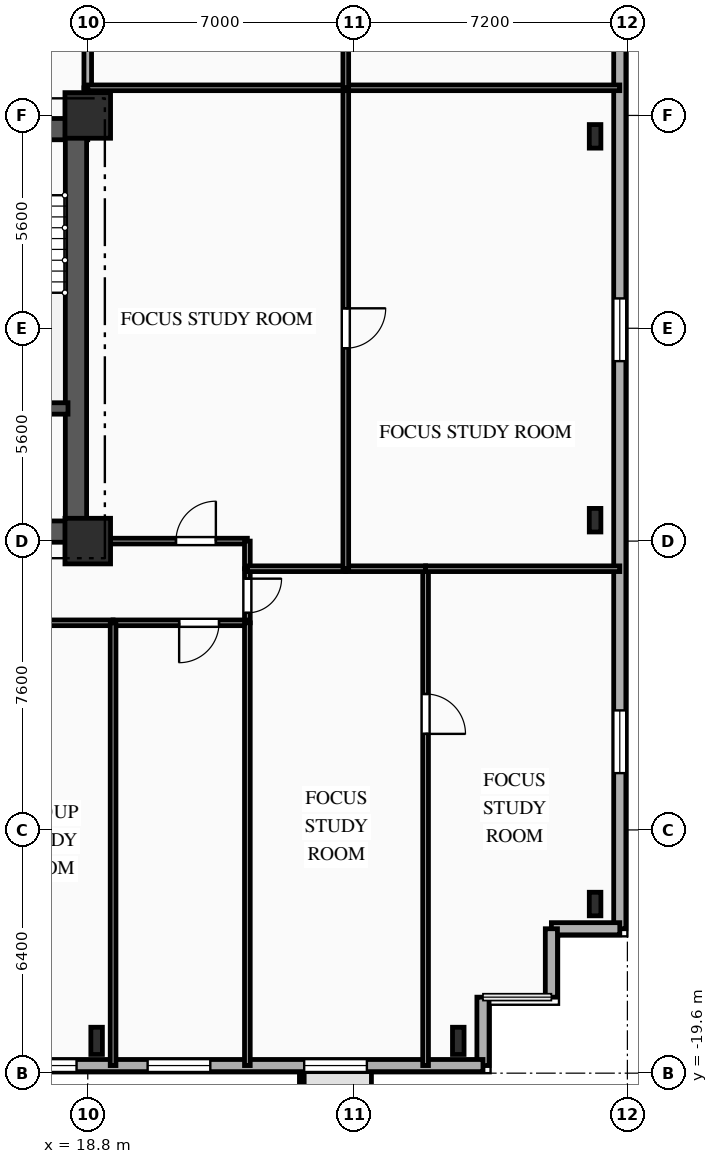
"""IFC4 building model, lengths in metres.
Left out: names, types, materials, properties, quantities, classifications, styles, units other than length and angle.
Written with IfcOpenShell. Run it as: python <this file> out.ifc"""

import sys

from ifc_helpers import new_model, si_unit, direction, frame, frame_2d, origin, origin_2d, place, context, subcontext, project, spatial, rectangle, i_section, extrude, element, fill, save


model = new_model("IFC4")
c1 = context("Model", 3, precision=1e-05, world=origin(), true_north=direction((0.0, 1.0)))
c2 = subcontext(c1, "Body", "Model", "MODEL_VIEW")
j1 = project(units=[si_unit("LENGTHUNIT", "METRE"), si_unit("PLANEANGLEUNIT", "RADIAN")], contexts=[c1])
p1 = place(None, origin())
s1 = spatial("IfcSite", under=j1, at=p1, CompositionType="ELEMENT")
p2 = place(p1, origin())
s2 = spatial("IfcBuilding", under=s1, at=p2, CompositionType="ELEMENT")
p3 = place(p2, frame((0.0, 0.0, 40.4)))
s3 = spatial("IfcBuildingStorey", under=s2, at=p3, CompositionType="ELEMENT", Elevation=40.4)
for number, where, z_axis, x_axis in (
    (1, (18.8, -5.6, 0.0), (0.0, 0.0, 1.0), (1.0, 0.0, 0.0)),
    (2, (18.8, 5.6, 0.0), (0.0, 0.0, 1.0), (1.0, 0.0, 0.0)),
):
    element("IfcColumn", number, at=place(p3, frame(where, z_axis=z_axis, x_axis=x_axis)), inside=s3, PredefinedType="COLUMN", context=c2, shape_type="SweptSolid", body=[
        extrude(rectangle(XDim=1.2, YDim=1.2, at=origin_2d()), origin(), (0.0, 0.0, 1.0), 3.35),
    ])
for number, where, z_axis, x_axis in (
    (3, (19.033, -18.75, 0.0), (0.0, 0.0, 1.0), (1.0, 0.0, 0.0)),
    (4, (28.55, -18.75, 0.0), (0.0, 0.0, 1.0), (1.0, 0.0, 0.0)),
):
    element("IfcColumn", number, at=place(p3, frame(where, z_axis=z_axis, x_axis=x_axis)), inside=s3, PredefinedType="COLUMN", context=c2, shape_type="SweptSolid", body=[
        extrude(i_section(OverallWidth=0.304, OverallDepth=0.716, WebThickness=0.021, FlangeThickness=0.04, FilletRadius=0.027, at=origin_2d()), origin(), (0.0, 0.0, 1.0), 3.35),
    ])
for number, where, z_axis, x_axis in (
    (5, (32.15, -15.15, 0.0), (0.0, 0.0, 1.0), (1.0, 0.0, 0.0)),
    (6, (32.15, -5.05, 0.0), (0.0, 0.0, 1.0), (1.0, 0.0, 0.0)),
    (7, (32.15, 5.05, 0.0), (0.0, 0.0, 1.0), (1.0, 0.0, 0.0)),
):
    element("IfcColumn", number, at=place(p3, frame(where, z_axis=z_axis, x_axis=x_axis)), inside=s3, PredefinedType="COLUMN", context=c2, shape_type="SweptSolid", body=[
        extrude(i_section(OverallWidth=0.305, OverallDepth=0.62, WebThickness=0.021, FlangeThickness=0.04, FilletRadius=0.027, at=origin_2d()), origin(), (0.0, 0.0, 1.0), 3.35),
    ])
p4 = place(p3, frame((32.8, 15.8, 0.0), z_axis=(0.0, 0.0, 1.0), x_axis=(0.0, -1.0, 0.0)))
e8 = element("IfcWall", 8, at=p4, inside=s3, PredefinedType="SOLIDWALL", context=c2, shape_type="SweptSolid", body=[
    extrude(rectangle(XDim=31.6, YDim=0.32, at=frame_2d((15.8, 0.0))), origin(), (0.0, 0.0, 1.0), 3.035),
])
p5 = place(p4, frame((4.175, 0.0, 0.85)))
e9 = element("IfcOpeningElement", 9, at=p5, cuts=e8, PredefinedType="OPENING", context=c2, shape_type="SweptSolid", body=[
    extrude(rectangle(XDim=1.65, YDim=1.85, at=frame_2d((0.825, 0.925))), frame((0.0, 0.17, 0.0), z_axis=(0.0, -1.0, 0.0), x_axis=(1.0, 0.0, 0.0)), (0.0, 0.0, 1.0), 0.34),
])
p6 = place(p4, frame((15.015, 0.0, 0.85)))
e10 = element("IfcOpeningElement", 10, at=p6, cuts=e8, PredefinedType="OPENING", context=c2, shape_type="SweptSolid", body=[
    extrude(rectangle(XDim=1.65, YDim=1.85, at=frame_2d((0.825, 0.925))), frame((0.0, 0.17, 0.0), z_axis=(0.0, -1.0, 0.0), x_axis=(1.0, 0.0, 0.0)), (0.0, 0.0, 1.0), 0.34),
])
p7 = place(p4, frame((25.855, 0.0, 0.85)))
e11 = element("IfcOpeningElement", 11, at=p7, cuts=e8, PredefinedType="OPENING", context=c2, shape_type="SweptSolid", body=[
    extrude(rectangle(XDim=1.65, YDim=1.85, at=frame_2d((0.825, 0.925))), frame((0.0, 0.17, 0.0), z_axis=(0.0, -1.0, 0.0), x_axis=(1.0, 0.0, 0.0)), (0.0, 0.0, 1.0), 0.34),
])
for number, where, z_axis, x_axis in (
    (12, (32.8, -15.8, 0.0), (0.0, 0.0, 1.0), (-1.0, 0.0, 0.0)),
    (13, (31.0, -15.8, 0.0), (0.0, 0.0, 1.0), (0.0, -1.0, 0.0)),
):
    element("IfcWall", number, at=place(p3, frame(where, z_axis=z_axis, x_axis=x_axis)), inside=s3, PredefinedType="SOLIDWALL", context=c2, shape_type="SweptSolid", body=[
        extrude(rectangle(XDim=1.8, YDim=0.32, at=frame_2d((0.9, 0.0))), origin(), (0.0, 0.0, 1.0), 3.035),
    ])
p8 = place(p3, frame((29.2, -17.6, 0.0), z_axis=(0.0, 0.0, 1.0), x_axis=(0.0, -1.0, 0.0)))
e14 = element("IfcWall", 14, at=p8, inside=s3, PredefinedType="SOLIDWALL", context=c2, shape_type="SweptSolid", body=[
    extrude(rectangle(XDim=1.8, YDim=0.32, at=frame_2d((0.9, 0.0))), origin(), (0.0, 0.0, 1.0), 3.035),
])
p9 = place(p3, frame((29.2, -19.4, 0.0), z_axis=(0.0, 0.0, 1.0), x_axis=(-1.0, 0.0, 0.0)))
e15 = element("IfcWall", 15, at=p9, inside=s3, PredefinedType="SOLIDWALL", context=c2, shape_type="SweptSolid", body=[
    extrude(rectangle(XDim=58.4, YDim=0.32, at=frame_2d((29.2, 0.0))), origin(), (0.0, 0.0, 1.0), 3.035),
])
p10 = place(p9, frame((3.055, 0.0, 0.85)))
e16 = element("IfcOpeningElement", 16, at=p10, cuts=e15, PredefinedType="OPENING", context=c2, shape_type="SweptSolid", body=[
    extrude(rectangle(XDim=1.65, YDim=1.85, at=frame_2d((0.825, 0.925))), frame((0.0, 0.17, 0.0), z_axis=(0.0, -1.0, 0.0), x_axis=(1.0, 0.0, 0.0)), (0.0, 0.0, 1.0), 0.34),
])
p11 = place(p9, frame((7.175, 0.0, 0.85)))
e17 = element("IfcOpeningElement", 17, at=p11, cuts=e15, PredefinedType="OPENING", context=c2, shape_type="SweptSolid", body=[
    extrude(rectangle(XDim=1.65, YDim=1.85, at=frame_2d((0.825, 0.925))), frame((0.0, 0.17, 0.0), z_axis=(0.0, -1.0, 0.0), x_axis=(1.0, 0.0, 0.0)), (0.0, 0.0, 1.0), 0.34),
])
p12 = place(p9, frame((10.695, 0.0, 0.85)))
e18 = element("IfcOpeningElement", 18, at=p12, cuts=e15, PredefinedType="OPENING", context=c2, shape_type="SweptSolid", body=[
    extrude(rectangle(XDim=1.65, YDim=1.85, at=frame_2d((0.825, 0.925))), frame((0.0, 0.17, 0.0), z_axis=(0.0, -1.0, 0.0), x_axis=(1.0, 0.0, 0.0)), (0.0, 0.0, 1.0), 0.34),
])
p13 = place(p9, frame((16.02, 0.0, 0.85)))
e19 = element("IfcOpeningElement", 19, at=p13, cuts=e15, PredefinedType="OPENING", context=c2, shape_type="SweptSolid", body=[
    extrude(rectangle(XDim=2.2, YDim=1.85, at=frame_2d((1.1, 0.925))), frame((0.0, 0.17, 0.0), z_axis=(0.0, -1.0, 0.0), x_axis=(1.0, 0.0, 0.0)), (0.0, 0.0, 1.0), 0.34),
])
p14 = place(p9, frame((23.7, 0.0, 0.85)))
e20 = element("IfcOpeningElement", 20, at=p14, cuts=e15, PredefinedType="OPENING", context=c2, shape_type="SweptSolid", body=[
    extrude(rectangle(XDim=2.2, YDim=1.85, at=frame_2d((1.1, 0.925))), frame((0.0, 0.17, 0.0), z_axis=(0.0, -1.0, 0.0), x_axis=(1.0, 0.0, 0.0)), (0.0, 0.0, 1.0), 0.34),
])
p15 = place(p9, frame((31.38, 0.0, 0.85)))
e21 = element("IfcOpeningElement", 21, at=p15, cuts=e15, PredefinedType="OPENING", context=c2, shape_type="SweptSolid", body=[
    extrude(rectangle(XDim=2.2, YDim=1.85, at=frame_2d((1.1, 0.925))), frame((0.0, 0.17, 0.0), z_axis=(0.0, -1.0, 0.0), x_axis=(1.0, 0.0, 0.0)), (0.0, 0.0, 1.0), 0.34),
])
p16 = place(p9, frame((39.06, 0.0, 0.85)))
e22 = element("IfcOpeningElement", 22, at=p16, cuts=e15, PredefinedType="OPENING", context=c2, shape_type="SweptSolid", body=[
    extrude(rectangle(XDim=2.2, YDim=1.85, at=frame_2d((1.1, 0.925))), frame((0.0, 0.17, 0.0), z_axis=(0.0, -1.0, 0.0), x_axis=(1.0, 0.0, 0.0)), (0.0, 0.0, 1.0), 0.34),
])
p17 = place(p9, frame((45.215, 0.0, 0.85)))
e23 = element("IfcOpeningElement", 23, at=p17, cuts=e15, PredefinedType="OPENING", context=c2, shape_type="SweptSolid", body=[
    extrude(rectangle(XDim=1.65, YDim=1.85, at=frame_2d((0.825, 0.925))), frame((0.0, 0.17, 0.0), z_axis=(0.0, -1.0, 0.0), x_axis=(1.0, 0.0, 0.0)), (0.0, 0.0, 1.0), 0.34),
])
p18 = place(p9, frame((49.335, 0.0, 0.85)))
e24 = element("IfcOpeningElement", 24, at=p18, cuts=e15, PredefinedType="OPENING", context=c2, shape_type="SweptSolid", body=[
    extrude(rectangle(XDim=1.65, YDim=1.85, at=frame_2d((0.825, 0.925))), frame((0.0, 0.17, 0.0), z_axis=(0.0, -1.0, 0.0), x_axis=(1.0, 0.0, 0.0)), (0.0, 0.0, 1.0), 0.34),
])
p19 = place(p3, frame((9.2, 5.24, 0.0), z_axis=(0.0, 0.0, 1.0), x_axis=(1.0, 0.0, 0.0)))
e25 = element("IfcWall", 25, at=p19, inside=s3, PredefinedType="SHEAR", context=c2, shape_type="SweptSolid", body=[
    extrude(rectangle(XDim=9.6, YDim=0.56, at=frame_2d((4.8, 0.0))), origin(), (0.0, 0.0, 1.0), 3.035),
])
p20 = place(p19, frame((6.95, 0.0, 0.0)))
e26 = element("IfcOpeningElement", 26, at=p20, cuts=e25, PredefinedType="OPENING", context=c2, shape_type="SweptSolid", body=[
    extrude(rectangle(XDim=1.1, YDim=2.15, at=frame_2d((0.55, 1.075))), frame((0.0, 0.29, 0.0), z_axis=(0.0, -1.0, 0.0), x_axis=(1.0, 0.0, 0.0)), (0.0, 0.0, 1.0), 0.58),
])
p21 = place(p19, frame((3.775, 0.0, 0.0)))
e27 = element("IfcOpeningElement", 27, at=p21, cuts=e25, PredefinedType="OPENING", context=c2, shape_type="SweptSolid", body=[
    extrude(rectangle(XDim=1.05, YDim=2.1, at=frame_2d((0.525, 1.05))), frame((0.0, 0.29, 0.0), z_axis=(0.0, -1.0, 0.0), x_axis=(1.0, 0.0, 0.0)), (0.0, 0.0, 1.0), 0.58),
])
p22 = place(p3, frame((9.2, -5.35, 0.0), z_axis=(0.0, 0.0, 1.0), x_axis=(1.0, 0.0, 0.0)))
e28 = element("IfcWall", 28, at=p22, inside=s3, PredefinedType="SHEAR", context=c2, shape_type="SweptSolid", body=[
    extrude(rectangle(XDim=9.6, YDim=0.56, at=frame_2d((4.8, 0.0))), origin(), (0.0, 0.0, 1.0), 3.035),
])
p23 = place(p22, frame((7.65, 0.0, 0.0)))
e29 = element("IfcOpeningElement", 29, at=p23, cuts=e28, PredefinedType="OPENING", context=c2, shape_type="SweptSolid", body=[
    extrude(rectangle(XDim=0.9, YDim=2.1, at=frame_2d((0.45, 1.05))), frame((0.0, 0.29, 0.0), z_axis=(0.0, -1.0, 0.0), x_axis=(1.0, 0.0, 0.0)), (0.0, 0.0, 1.0), 0.58),
])
p24 = place(p3, frame((18.49, -5.05, 0.0), z_axis=(0.0, 0.0, 1.0), x_axis=(0.0, 1.0, 0.0)))
e30 = element("IfcWall", 30, at=p24, inside=s3, PredefinedType="SHEAR", context=c2, shape_type="SweptSolid", body=[
    extrude(rectangle(XDim=10.1, YDim=0.56, at=frame_2d((5.05, 0.0))), origin(), (0.0, 0.0, 1.0), 3.035),
])
p25 = place(p3, frame((15.1, -2.11, 0.0), z_axis=(0.0, 0.0, 1.0), x_axis=(1.0, 0.0, 0.0)))
e31 = element("IfcWall", 31, at=p25, inside=s3, PredefinedType="SHEAR", context=c2, shape_type="SweptSolid", body=[
    extrude(rectangle(XDim=3.18, YDim=0.3, at=frame_2d((1.59, 0.0))), origin(), (0.0, 0.0, 1.0), 3.035),
])
p26 = place(p3, frame((18.8, 5.6, 0.0), z_axis=(0.0, 0.0, 1.0), x_axis=(0.0, 1.0, 0.0)))
e32 = element("IfcWall", 32, at=p26, inside=s3, PredefinedType="PARTITIONING", context=c2, shape_type="SweptSolid", body=[
    extrude(rectangle(XDim=0.727, YDim=0.2, at=frame_2d((0.363, 0.0))), origin(), (0.0, 0.0, 1.0), 2.52),
])
p27 = place(p3, frame((18.8, 6.327, 0.0), z_axis=(0.0, 0.0, 1.0), x_axis=(0.0, 1.0, 0.0)))
e33 = element("IfcWall", 33, at=p27, inside=s3, PredefinedType="PARTITIONING", context=c2, shape_type="SweptSolid", body=[
    extrude(rectangle(XDim=2.173, YDim=0.2, at=frame_2d((1.086, 0.0))), origin(), (0.0, 0.0, 1.0), 2.52),
])
p28 = place(p3, frame((23.0, -6.327, 0.0), z_axis=(0.0, 0.0, 1.0), x_axis=(0.0, -1.0, 0.0)))
e34 = element("IfcWall", 34, at=p28, inside=s3, PredefinedType="PARTITIONING", context=c2, shape_type="SweptSolid", body=[
    extrude(rectangle(XDim=1.423, YDim=0.15, at=frame_2d((0.711, 0.0))), origin(), (0.0, 0.0, 1.0), 3.035),
])
p29 = place(p28, frame((0.261, 0.0, 0.0)))
e35 = element("IfcOpeningElement", 35, at=p29, cuts=e34, PredefinedType="OPENING", context=c2, shape_type="SweptSolid", body=[
    extrude(rectangle(XDim=0.9, YDim=2.1, at=frame_2d((0.45, 1.05))), frame((0.0, 0.085, 0.0), z_axis=(0.0, -1.0, 0.0), x_axis=(1.0, 0.0, 0.0)), (0.0, 0.0, 1.0), 0.17),
])
p30 = place(p3, frame((18.8, -5.6, 0.0), z_axis=(0.0, 0.0, 1.0), x_axis=(1.0, 0.0, 0.0)))
e36 = element("IfcWall", 36, at=p30, inside=s3, PredefinedType="PARTITIONING", context=c2, shape_type="SweptSolid", body=[
    extrude(rectangle(XDim=4.2, YDim=0.15, at=frame_2d((2.1, 0.0))), origin(), (0.0, 0.0, 1.0), 3.035),
])
p31 = place(p30, frame((2.321, 0.0, 0.0)))
e37 = element("IfcOpeningElement", 37, at=p31, cuts=e36, PredefinedType="OPENING", context=c2, shape_type="SweptSolid", body=[
    extrude(rectangle(XDim=1.05, YDim=2.15, at=frame_2d((0.525, 1.075))), frame((0.0, 0.085, 0.0), z_axis=(0.0, -1.0, 0.0), x_axis=(1.0, 0.0, 0.0)), (0.0, 0.0, 1.0), 0.17),
])
p32 = place(p3, frame((23.0, -5.6, 0.0), z_axis=(0.0, 0.0, 1.0), x_axis=(0.0, -1.0, 0.0)))
e38 = element("IfcWall", 38, at=p32, inside=s3, PredefinedType="PARTITIONING", context=c2, shape_type="SweptSolid", body=[
    extrude(rectangle(XDim=0.727, YDim=0.15, at=frame_2d((0.363, 0.0))), origin(), (0.0, 0.0, 1.0), 3.035),
])
p33 = place(p3, frame((19.467, -7.75, 0.0), z_axis=(0.0, 0.0, 1.0), x_axis=(-1.0, 0.0, 0.0)))
e39 = element("IfcWall", 39, at=p33, inside=s3, PredefinedType="PARTITIONING", context=c2, shape_type="SweptSolid", body=[
    extrude(rectangle(XDim=3.533, YDim=0.15, at=frame_2d((1.767, 0.0))), origin(), (0.0, 0.0, 1.0), 3.035),
])
p34 = place(p33, frame((1.738, 0.0, 0.0)))
e40 = element("IfcOpeningElement", 40, at=p34, cuts=e39, PredefinedType="OPENING", context=c2, shape_type="SweptSolid", body=[
    extrude(rectangle(XDim=1.05, YDim=2.15, at=frame_2d((0.525, 1.075))), frame((0.0, 0.085, 0.0), z_axis=(0.0, -1.0, 0.0), x_axis=(1.0, 0.0, 0.0)), (0.0, 0.0, 1.0), 0.17),
])
p35 = place(p3, frame((23.0, -7.75, 0.0), z_axis=(0.0, 0.0, 1.0), x_axis=(-1.0, 0.0, 0.0)))
e41 = element("IfcWall", 41, at=p35, inside=s3, PredefinedType="PARTITIONING", context=c2, shape_type="SweptSolid", body=[
    extrude(rectangle(XDim=3.533, YDim=0.15, at=frame_2d((1.767, 0.0))), origin(), (0.0, 0.0, 1.0), 3.035),
])
p36 = place(p35, frame((0.745, 0.0, 0.0)))
e42 = element("IfcOpeningElement", 42, at=p36, cuts=e41, PredefinedType="OPENING", context=c2, shape_type="SweptSolid", body=[
    extrude(rectangle(XDim=1.05, YDim=2.15, at=frame_2d((0.525, 1.075))), frame((0.0, 0.085, 0.0), z_axis=(0.0, -1.0, 0.0), x_axis=(1.0, 0.0, 0.0)), (0.0, 0.0, 1.0), 0.17),
])
p37 = place(p3, frame((27.69, -6.327, 0.0), z_axis=(0.0, 0.0, 1.0), x_axis=(0.0, -1.0, 0.0)))
e43 = element("IfcWall", 43, at=p37, inside=s3, PredefinedType="PARTITIONING", context=c2, shape_type="SweptSolid", body=[
    extrude(rectangle(XDim=13.073, YDim=0.15, at=frame_2d((6.537, 0.0))), origin(), (0.0, 0.0, 1.0), 3.035),
])
p38 = place(p37, frame((3.296, 0.0, 0.0)))
e44 = element("IfcOpeningElement", 44, at=p38, cuts=e43, PredefinedType="OPENING", context=c2, shape_type="SweptSolid", body=[
    extrude(rectangle(XDim=1.05, YDim=2.15, at=frame_2d((0.525, 1.075))), frame((0.0, 0.085, 0.0), z_axis=(0.0, -1.0, 0.0), x_axis=(1.0, 0.0, 0.0)), (0.0, 0.0, 1.0), 0.17),
])
p39 = place(p3, frame((23.0, -6.327, 0.0), z_axis=(0.0, 0.0, 1.0), x_axis=(1.0, 0.0, 0.0)))
e45 = element("IfcWall", 45, at=p39, inside=s3, PredefinedType="PARTITIONING", context=c2, shape_type="SweptSolid", body=[
    extrude(rectangle(XDim=2.59, YDim=0.15, at=frame_2d((1.295, 0.0))), origin(), (0.0, 0.0, 1.0), 3.035),
])
p40 = place(p3, frame((25.59, -6.327, 0.0), z_axis=(0.0, 0.0, 1.0), x_axis=(1.0, 0.0, 0.0)))
e46 = element("IfcWall", 46, at=p40, inside=s3, PredefinedType="PARTITIONING", context=c2, shape_type="SweptSolid", body=[
    extrude(rectangle(XDim=2.1, YDim=0.15, at=frame_2d((1.05, 0.0))), origin(), (0.0, 0.0, 1.0), 3.035),
])
p41 = place(p3, frame((23.0, -19.4, 0.0), z_axis=(0.0, 0.0, 1.0), x_axis=(0.0, 1.0, 0.0)))
e47 = element("IfcWall", 47, at=p41, inside=s3, PredefinedType="PARTITIONING", context=c2, shape_type="SweptSolid", body=[
    extrude(rectangle(XDim=11.65, YDim=0.15, at=frame_2d((5.825, 0.0))), origin(), (0.0, 0.0, 1.0), 3.035),
])
p42 = place(p3, frame((27.69, -6.327, 0.0), z_axis=(0.0, 0.0, 1.0), x_axis=(1.0, 0.0, 0.0)))
e48 = element("IfcWall", 48, at=p42, inside=s3, PredefinedType="PARTITIONING", context=c2, shape_type="SweptSolid", body=[
    extrude(rectangle(XDim=5.11, YDim=0.15, at=frame_2d((2.555, 0.0))), origin(), (0.0, 0.0, 1.0), 3.035),
])
p43 = place(p3, frame((25.59, 6.327, 0.0), z_axis=(0.0, 0.0, 1.0), x_axis=(0.0, -1.0, 0.0)))
e49 = element("IfcWall", 49, at=p43, inside=s3, PredefinedType="PARTITIONING", context=c2, shape_type="SweptSolid", body=[
    extrude(rectangle(XDim=12.654, YDim=0.15, at=frame_2d((6.327, 0.0))), origin(), (0.0, 0.0, 1.0), 2.69),
])
p44 = place(p43, frame((5.802, 0.0, 0.0)))
e50 = element("IfcOpeningElement", 50, at=p44, cuts=e49, PredefinedType="OPENING", context=c2, shape_type="SweptSolid", body=[
    extrude(rectangle(XDim=1.05, YDim=2.15, at=frame_2d((0.525, 1.075))), frame((0.0, 0.085, 0.0), z_axis=(0.0, -1.0, 0.0), x_axis=(1.0, 0.0, 0.0)), (0.0, 0.0, 1.0), 0.17),
])
p45 = place(p3, frame((18.8, 6.327, 0.0), z_axis=(0.0, 0.0, 1.0), x_axis=(1.0, 0.0, 0.0)))
e51 = element("IfcWall", 51, at=p45, inside=s3, PredefinedType="PARTITIONING", context=c2, shape_type="SweptSolid", body=[
    extrude(rectangle(XDim=6.79, YDim=0.15, at=frame_2d((3.395, 0.0))), origin(), (0.0, 0.0, 1.0), 3.035),
])
p46 = place(p3, frame((25.59, 6.327, 0.0), z_axis=(0.0, 0.0, 1.0), x_axis=(1.0, 0.0, 0.0)))
e52 = element("IfcWall", 52, at=p46, inside=s3, PredefinedType="PARTITIONING", context=c2, shape_type="SweptSolid", body=[
    extrude(rectangle(XDim=7.21, YDim=0.15, at=frame_2d((3.605, 0.0))), origin(), (0.0, 0.0, 1.0), 3.035),
])
p47 = place(p3, frame((25.59, 19.4, 0.0), z_axis=(0.0, 0.0, 1.0), x_axis=(0.0, -1.0, 0.0)))
e53 = element("IfcWall", 53, at=p47, inside=s3, PredefinedType="PARTITIONING", context=c2, shape_type="SweptSolid", body=[
    extrude(rectangle(XDim=13.073, YDim=0.15, at=frame_2d((6.537, 0.0))), origin(), (0.0, 0.0, 1.0), 2.69),
])
p48 = place(p47, frame((8.727, 0.0, 0.0)))
e54 = element("IfcOpeningElement", 54, at=p48, cuts=e53, PredefinedType="OPENING", context=c2, shape_type="SweptSolid", body=[
    extrude(rectangle(XDim=1.05, YDim=2.15, at=frame_2d((0.525, 1.075))), frame((0.0, 0.085, 0.0), z_axis=(0.0, -1.0, 0.0), x_axis=(1.0, 0.0, 0.0)), (0.0, 0.0, 1.0), 0.17),
])
p49 = place(p3, frame((19.467, -7.75, 0.0), z_axis=(0.0, 0.0, 1.0), x_axis=(0.0, -1.0, 0.0)))
e55 = element("IfcWall", 55, at=p49, inside=s3, PredefinedType="PARTITIONING", context=c2, shape_type="SweptSolid", body=[
    extrude(rectangle(XDim=11.65, YDim=0.15, at=frame_2d((5.825, 0.0))), origin(), (0.0, 0.0, 1.0), 3.035),
])
p50 = place(p6, origin())
e56 = element("IfcWindow", 56, at=p50, inside=s3, PartitioningType="SINGLE_PANEL", PredefinedType="WINDOW", context=c2, shape_type="SweptSolid", body=[
    extrude(rectangle(XDim=1.65, YDim=1.85, at=frame_2d((0.825, 0.925))), frame((0.0, 0.03, 0.0), z_axis=(0.0, -1.0, 0.0), x_axis=(1.0, 0.0, 0.0)), (0.0, 0.0, 1.0), 0.06),
])
fill(e10, e56)
p51 = place(p7, origin())
e57 = element("IfcWindow", 57, at=p51, inside=s3, PartitioningType="SINGLE_PANEL", PredefinedType="WINDOW", context=c2, shape_type="SweptSolid", body=[
    extrude(rectangle(XDim=1.65, YDim=1.85, at=frame_2d((0.825, 0.925))), frame((0.0, 0.03, 0.0), z_axis=(0.0, -1.0, 0.0), x_axis=(1.0, 0.0, 0.0)), (0.0, 0.0, 1.0), 0.06),
])
fill(e11, e57)
p52 = place(p10, origin())
e58 = element("IfcWindow", 58, at=p52, inside=s3, PartitioningType="SINGLE_PANEL", PredefinedType="WINDOW", context=c2, shape_type="SweptSolid", body=[
    extrude(rectangle(XDim=1.65, YDim=1.85, at=frame_2d((0.825, 0.925))), frame((0.0, 0.03, 0.0), z_axis=(0.0, -1.0, 0.0), x_axis=(1.0, 0.0, 0.0)), (0.0, 0.0, 1.0), 0.06),
])
fill(e16, e58)
p53 = place(p11, origin())
e59 = element("IfcWindow", 59, at=p53, inside=s3, PartitioningType="SINGLE_PANEL", PredefinedType="WINDOW", context=c2, shape_type="SweptSolid", body=[
    extrude(rectangle(XDim=1.65, YDim=1.85, at=frame_2d((0.825, 0.925))), frame((0.0, 0.03, 0.0), z_axis=(0.0, -1.0, 0.0), x_axis=(1.0, 0.0, 0.0)), (0.0, 0.0, 1.0), 0.06),
])
fill(e17, e59)
p54 = place(p12, origin())
e60 = element("IfcWindow", 60, at=p54, inside=s3, PartitioningType="SINGLE_PANEL", PredefinedType="WINDOW", context=c2, shape_type="SweptSolid", body=[
    extrude(rectangle(XDim=1.65, YDim=1.85, at=frame_2d((0.825, 0.925))), frame((0.0, 0.03, 0.0), z_axis=(0.0, -1.0, 0.0), x_axis=(1.0, 0.0, 0.0)), (0.0, 0.0, 1.0), 0.06),
])
fill(e18, e60)
p55 = place(p29, origin())
e61 = element("IfcDoor", 61, at=p55, inside=s3, OperationType="SINGLE_SWING_LEFT", PredefinedType="DOOR", context=c2, shape_type="SweptSolid", body=[
    extrude(rectangle(XDim=0.9, YDim=2.1, at=frame_2d((0.45, 1.05))), frame((0.0, 0.025, 0.0), z_axis=(0.0, -1.0, 0.0), x_axis=(1.0, 0.0, 0.0)), (0.0, 0.0, 1.0), 0.05),
])
fill(e35, e61)
p56 = place(p31, origin())
e62 = element("IfcDoor", 62, at=p56, inside=s3, OperationType="SINGLE_SWING_RIGHT", PredefinedType="DOOR", context=c2, shape_type="SweptSolid", body=[
    extrude(rectangle(XDim=1.05, YDim=2.15, at=frame_2d((0.525, 1.075))), frame((0.0, 0.025, 0.0), z_axis=(0.0, -1.0, 0.0), x_axis=(1.0, 0.0, 0.0)), (0.0, 0.0, 1.0), 0.05),
])
fill(e37, e62)
p57 = place(p36, origin())
e63 = element("IfcDoor", 63, at=p57, inside=s3, OperationType="SINGLE_SWING_RIGHT", PredefinedType="DOOR", context=c2, shape_type="SweptSolid", body=[
    extrude(rectangle(XDim=1.05, YDim=2.15, at=frame_2d((0.525, 1.075))), frame((0.0, 0.025, 0.0), z_axis=(0.0, -1.0, 0.0), x_axis=(1.0, 0.0, 0.0)), (0.0, 0.0, 1.0), 0.05),
])
fill(e42, e63)
p58 = place(p38, origin())
e64 = element("IfcDoor", 64, at=p58, inside=s3, OperationType="SINGLE_SWING_RIGHT", PredefinedType="DOOR", context=c2, shape_type="SweptSolid", body=[
    extrude(rectangle(XDim=1.05, YDim=2.15, at=frame_2d((0.525, 1.075))), frame((0.0, 0.025, 0.0), z_axis=(0.0, -1.0, 0.0), x_axis=(1.0, 0.0, 0.0)), (0.0, 0.0, 1.0), 0.05),
])
fill(e44, e64)
p59 = place(p44, origin())
e65 = element("IfcDoor", 65, at=p59, inside=s3, OperationType="SINGLE_SWING_LEFT", PredefinedType="DOOR", context=c2, shape_type="SweptSolid", body=[
    extrude(rectangle(XDim=1.05, YDim=2.15, at=frame_2d((0.525, 1.075))), frame((0.0, 0.025, 0.0), z_axis=(0.0, -1.0, 0.0), x_axis=(1.0, 0.0, 0.0)), (0.0, 0.0, 1.0), 0.05),
])
fill(e50, e65)
save(model, sys.argv[1])
